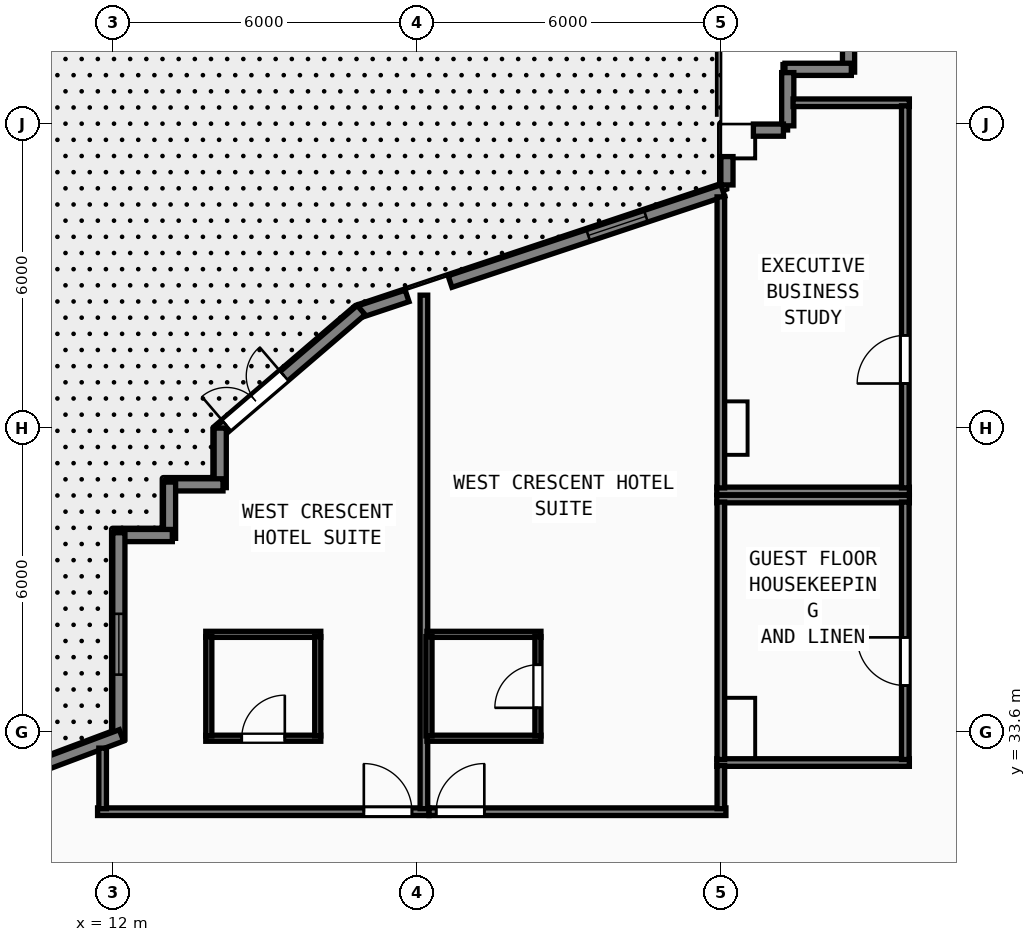
"""IFC4 building model, lengths in metres.
Left out: names, types, materials, properties, quantities, classifications, styles, units other than length and angle.
Written with IfcOpenShell. Run it as: python <this file> out.ifc"""

import sys

from ifc_helpers import new_model, si_unit, direction, frame, frame_2d, origin, origin_2d, place, context, subcontext, project, spatial, rectangle, hollow_rectangle, extrude, element, fill, save


model = new_model("IFC4")
c1 = context("Model", 3, precision=1e-05, world=origin(), true_north=direction((0.0, 1.0)))
c2 = subcontext(c1, "Body", "Model", "MODEL_VIEW")
j1 = project(units=[si_unit("LENGTHUNIT", "METRE"), si_unit("PLANEANGLEUNIT", "RADIAN")], contexts=[c1])
p1 = place(None, origin())
s1 = spatial("IfcSite", under=j1, at=p1, CompositionType="ELEMENT")
p2 = place(p1, origin())
s2 = spatial("IfcBuilding", under=s1, at=p2, CompositionType="ELEMENT")
p3 = place(p2, frame((0.0, 0.0, 24.0)))
s3 = spatial("IfcBuildingStorey", under=s2, at=p3, CompositionType="ELEMENT", Elevation=24.0)
for number, where, z_axis, x_axis in (
    (1, (24.0, 33.6, 0.0), (0.0, 0.0, 1.0), (1.0, 0.0, 0.0)),
    (2, (24.0, 45.6, 0.0), (0.0, 0.0, 1.0), (1.0, 0.0, 0.0)),
):
    element("IfcColumn", number, at=place(p3, frame(where, z_axis=z_axis, x_axis=x_axis)), inside=s3, PredefinedType="COLUMN", context=c2, shape_type="SweptSolid", body=[
        extrude(hollow_rectangle(XDim=1.3, YDim=1.3, WallThickness=0.048, at=origin_2d()), origin(), (0.0, 0.0, 1.0), 3.8),
    ])
for number, where, z_axis, x_axis in (
    (3, (24.0, 39.6, -0.26), (0.0, 0.0, 1.0), (1.0, 0.0, 0.0)),
    (4, (18.3, 42.0, -0.26), (0.0, 0.0, 1.0), (1.0, 0.0, 0.0)),
):
    element("IfcColumn", number, at=place(p3, frame(where, z_axis=z_axis, x_axis=x_axis)), inside=s3, PredefinedType="COLUMN", context=c2, shape_type="SweptSolid", body=[
        extrude(hollow_rectangle(XDim=1.0, YDim=1.0, WallThickness=0.038, at=origin_2d()), origin(), (0.0, 0.0, 1.0), 4.06),
    ])
p4 = place(p3, frame((26.52, 47.995, 0.0), z_axis=(0.0, 0.0, 1.0), x_axis=(0.0, -1.0, 0.0)))
e5 = element("IfcWall", 5, at=p4, inside=s3, PredefinedType="SOLIDWALL", context=c2, shape_type="SweptSolid", body=[
    extrude(rectangle(XDim=1.37, YDim=0.24, at=frame_2d((0.685, 0.0))), origin(), (0.0, 0.0, 1.0), 3.6),
])
p5 = place(p3, frame((26.575, 46.68, 0.0), z_axis=(0.0, 0.0, 1.0), x_axis=(-1.0, 0.0, 0.0)))
e6 = element("IfcWall", 6, at=p5, inside=s3, PredefinedType="SOLIDWALL", context=c2, shape_type="SweptSolid", body=[
    extrude(rectangle(XDim=1.31, YDim=0.24, at=frame_2d((0.655, 0.0))), origin(), (0.0, 0.0, 1.0), 3.6),
])
p6 = place(p3, frame((25.32, 46.615, 0.0), z_axis=(0.0, 0.0, 1.0), x_axis=(0.0, -1.0, 0.0)))
e7 = element("IfcWall", 7, at=p6, inside=s3, PredefinedType="SOLIDWALL", context=c2, shape_type="SweptSolid", body=[
    extrude(rectangle(XDim=1.05, YDim=0.24, at=frame_2d((0.525, 0.0))), origin(), (0.0, 0.0, 1.0), 3.6),
])
p7 = place(p3, frame((25.235, 45.48, 0.0), z_axis=(0.0, 0.0, 1.0), x_axis=(-1.0, 0.0, 0.0)))
e8 = element("IfcWall", 8, at=p7, inside=s3, PredefinedType="SOLIDWALL", context=c2, shape_type="SweptSolid", body=[
    extrude(rectangle(XDim=0.593, YDim=0.24, at=frame_2d((0.296, 0.0))), origin(), (0.0, 0.0, 1.0), 3.6),
])
p8 = place(p3, frame((24.12, 44.958, 0.0), z_axis=(0.0, 0.0, 1.0), x_axis=(0.0, -1.0, 0.0)))
e9 = element("IfcWall", 9, at=p8, inside=s3, PredefinedType="SOLIDWALL", context=c2, shape_type="SweptSolid", body=[
    extrude(rectangle(XDim=0.56, YDim=0.24, at=frame_2d((0.28, 0.0))), origin(), (0.0, 0.0, 1.0), 3.097),
])
p9 = place(p3, frame((24.039, 44.287, 0.0), z_axis=(0.0, 0.0, 1.0), x_axis=(-0.948678995954, -0.316240672014, 0.0)))
e10 = element("IfcWall", 10, at=p9, inside=s3, PredefinedType="SOLIDWALL", context=c2, shape_type="SweptSolid", body=[
    extrude(rectangle(XDim=5.675, YDim=0.24, at=frame_2d((2.837, 0.0))), origin(), (0.0, 0.0, 1.0), 3.097),
])
p10 = place(p9, frame((1.6, 0.0, 0.85)))
e11 = element("IfcOpeningElement", 11, at=p10, cuts=e10, PredefinedType="OPENING", context=c2, shape_type="SweptSolid", body=[
    extrude(rectangle(XDim=1.2, YDim=1.85, at=frame_2d((0.6, 0.925))), frame((0.0, 0.13, 0.0), z_axis=(0.0, -1.0, 0.0), x_axis=(1.0, 0.0, 0.0)), (0.0, 0.0, 1.0), 0.26),
])
p11 = place(p3, frame((17.808, 42.209, 0.0), z_axis=(0.0, 0.0, 1.0), x_axis=(-0.948706457285, -0.316158279832, 0.0)))
e12 = element("IfcWall", 12, at=p11, inside=s3, PredefinedType="SOLIDWALL", context=c2, shape_type="SweptSolid", body=[
    extrude(rectangle(XDim=1.054, YDim=0.24, at=frame_2d((0.527, 0.0))), origin(), (0.0, 0.0, 1.0), 3.6),
])
p12 = place(p3, frame((16.902, 41.929, 0.0), z_axis=(0.0, 0.0, 1.0), x_axis=(-0.759275136126, -0.650769750112, 0.0)))
e13 = element("IfcWall", 13, at=p12, inside=s3, PredefinedType="SOLIDWALL", context=c2, shape_type="SweptSolid", body=[
    extrude(rectangle(XDim=3.719, YDim=0.24, at=frame_2d((1.86, 0.0))), origin(), (0.0, 0.0, 1.0), 3.6),
])
p13 = place(p12, frame((3.499, 0.0, 0.0), z_axis=(0.0, 0.0, 1.0), x_axis=(-1.0, 0.0, 0.0)))
e14 = element("IfcOpeningElement", 14, at=p13, cuts=e13, PredefinedType="OPENING", context=c2, shape_type="SweptSolid", body=[
    extrude(rectangle(XDim=1.5, YDim=2.2, at=frame_2d((0.75, 1.1))), frame((0.0, 0.13, 0.0), z_axis=(0.0, -1.0, 0.0), x_axis=(1.0, 0.0, 0.0)), (0.0, 0.0, 1.0), 0.26),
])
p14 = place(p3, frame((14.12, 39.6, 0.0), z_axis=(0.0, 0.0, 1.0), x_axis=(0.0, -1.0, 0.0)))
e15 = element("IfcWall", 15, at=p14, inside=s3, PredefinedType="SOLIDWALL", context=c2, shape_type="SweptSolid", body=[
    extrude(rectangle(XDim=1.175, YDim=0.24, at=frame_2d((0.587, 0.0))), origin(), (0.0, 0.0, 1.0), 3.6),
])
p15 = place(p3, frame((14.175, 38.48, 0.0), z_axis=(0.0, 0.0, 1.0), x_axis=(-1.0, 0.0, 0.0)))
e16 = element("IfcWall", 16, at=p15, inside=s3, PredefinedType="SOLIDWALL", context=c2, shape_type="SweptSolid", body=[
    extrude(rectangle(XDim=1.11, YDim=0.24, at=frame_2d((0.555, 0.0))), origin(), (0.0, 0.0, 1.0), 3.6),
])
p16 = place(p3, frame((13.12, 38.535, 0.0), z_axis=(0.0, 0.0, 1.0), x_axis=(0.0, -1.0, 0.0)))
e17 = element("IfcWall", 17, at=p16, inside=s3, PredefinedType="SOLIDWALL", context=c2, shape_type="SweptSolid", body=[
    extrude(rectangle(XDim=1.11, YDim=0.24, at=frame_2d((0.555, 0.0))), origin(), (0.0, 0.0, 1.0), 3.6),
])
p17 = place(p3, frame((13.175, 37.48, 0.0), z_axis=(0.0, 0.0, 1.0), x_axis=(-1.0, 0.0, 0.0)))
e18 = element("IfcWall", 18, at=p17, inside=s3, PredefinedType="SOLIDWALL", context=c2, shape_type="SweptSolid", body=[
    extrude(rectangle(XDim=1.11, YDim=0.24, at=frame_2d((0.555, 0.0))), origin(), (0.0, 0.0, 1.0), 3.6),
])
p18 = place(p3, frame((12.12, 37.535, 0.0), z_axis=(0.0, 0.0, 1.0), x_axis=(0.0, -1.0, 0.0)))
e19 = element("IfcWall", 19, at=p18, inside=s3, PredefinedType="SOLIDWALL", context=c2, shape_type="SweptSolid", body=[
    extrude(rectangle(XDim=4.073, YDim=0.24, at=frame_2d((2.037, 0.0))), origin(), (0.0, 0.0, 1.0), 3.6),
])
p19 = place(p18, frame((1.6, 0.0, 0.85)))
e20 = element("IfcOpeningElement", 20, at=p19, cuts=e19, PredefinedType="OPENING", context=c2, shape_type="SweptSolid", body=[
    extrude(rectangle(XDim=1.2, YDim=1.85, at=frame_2d((0.6, 0.925))), frame((0.0, 0.13, 0.0), z_axis=(0.0, -1.0, 0.0), x_axis=(1.0, 0.0, 0.0)), (0.0, 0.0, 1.0), 0.26),
])
p20 = place(p3, frame((12.171, 33.536, 0.0), z_axis=(0.0, 0.0, 1.0), x_axis=(-0.936327744176, -0.351127263946, 0.0)))
e21 = element("IfcWall", 21, at=p20, inside=s3, PredefinedType="SOLIDWALL", context=c2, shape_type="SweptSolid", body=[
    extrude(rectangle(XDim=7.0, YDim=0.24, at=frame_2d((3.5, 0.0))), origin(), (0.0, 0.0, 1.0), 3.6),
])
p21 = place(p20, frame((1.6, 0.0, 0.85)))
e22 = element("IfcOpeningElement", 22, at=p21, cuts=e21, PredefinedType="OPENING", context=c2, shape_type="SweptSolid", body=[
    extrude(rectangle(XDim=1.2, YDim=1.85, at=frame_2d((0.6, 0.925))), frame((0.0, 0.13, 0.0), z_axis=(0.0, -1.0, 0.0), x_axis=(1.0, 0.0, 0.0)), (0.0, 0.0, 1.0), 0.26),
])
for number, where, z_axis, x_axis in (
    (23, (23.92, 38.2, 0.0), (0.0, 0.0, 1.0), (1.0, 0.0, 0.0)),
    (24, (23.92, 33.0, 0.0), (0.0, 0.0, 1.0), (1.0, 0.0, 0.0)),
):
    element("IfcWall", number, at=place(p3, frame(where, z_axis=z_axis, x_axis=x_axis)), inside=s3, PredefinedType="PARTITIONING", context=c2, shape_type="SweptSolid", body=[
        extrude(rectangle(XDim=3.8, YDim=0.15, at=frame_2d((1.9, 0.0))), origin(), (0.0, 0.0, 1.0), 3.6),
    ])
p22 = place(p3, frame((24.0, 33.06, 0.0), z_axis=(0.0, 0.0, 1.0), x_axis=(0.0, 1.0, 0.0)))
e25 = element("IfcWall", 25, at=p22, inside=s3, PredefinedType="PARTITIONING", context=c2, shape_type="SweptSolid", body=[
    extrude(rectangle(XDim=5.08, YDim=0.15, at=frame_2d((2.54, 0.0))), origin(), (0.0, 0.0, 1.0), 3.097),
])
p23 = place(p3, frame((27.64, 33.06, 0.0), z_axis=(0.0, 0.0, 1.0), x_axis=(0.0, 1.0, 0.0)))
e26 = element("IfcWall", 26, at=p23, inside=s3, PredefinedType="PARTITIONING", context=c2, shape_type="SweptSolid", body=[
    extrude(rectangle(XDim=5.08, YDim=0.15, at=frame_2d((2.54, 0.0))), origin(), (0.0, 0.0, 1.0), 3.6),
])
p24 = place(p23, frame((2.41, 0.0, 0.0), z_axis=(0.0, 0.0, 1.0), x_axis=(-1.0, 0.0, 0.0)))
e27 = element("IfcOpeningElement", 27, at=p24, cuts=e26, PredefinedType="OPENING", context=c2, shape_type="SweptSolid", body=[
    extrude(rectangle(XDim=0.95, YDim=2.12, at=frame_2d((0.475, 1.06))), frame((0.0, 0.085, 0.0), z_axis=(0.0, -1.0, 0.0), x_axis=(1.0, 0.0, 0.0)), (0.0, 0.0, 1.0), 0.17),
])
p25 = place(p3, frame((25.425, 46.02, 0.0), z_axis=(0.0, 0.0, 1.0), x_axis=(1.0, 0.0, 0.0)))
e28 = element("IfcWall", 28, at=p25, inside=s3, PredefinedType="PARTITIONING", context=c2, shape_type="SweptSolid", body=[
    extrude(rectangle(XDim=2.295, YDim=0.15, at=frame_2d((1.147, 0.0))), origin(), (0.0, 0.0, 1.0), 3.6),
])
p26 = place(p3, frame((23.92, 38.36, 0.0), z_axis=(0.0, 0.0, 1.0), x_axis=(1.0, 0.0, 0.0)))
e29 = element("IfcWall", 29, at=p26, inside=s3, PredefinedType="PARTITIONING", context=c2, shape_type="SweptSolid", body=[
    extrude(rectangle(XDim=3.8, YDim=0.15, at=frame_2d((1.9, 0.0))), origin(), (0.0, 0.0, 1.0), 3.6),
])
p27 = place(p3, frame((24.0, 38.42, 0.0), z_axis=(0.0, 0.0, 1.0), x_axis=(0.0, 1.0, 0.0)))
e30 = element("IfcWall", 30, at=p27, inside=s3, PredefinedType="PARTITIONING", context=c2, shape_type="SweptSolid", body=[
    extrude(rectangle(XDim=5.743, YDim=0.15, at=frame_2d((2.872, 0.0))), origin(), (0.0, 0.0, 1.0), 3.097),
])
p28 = place(p3, frame((27.64, 38.42, 0.0), z_axis=(0.0, 0.0, 1.0), x_axis=(0.0, 1.0, 0.0)))
e31 = element("IfcWall", 31, at=p28, inside=s3, PredefinedType="PARTITIONING", context=c2, shape_type="SweptSolid", body=[
    extrude(rectangle(XDim=7.54, YDim=0.15, at=frame_2d((3.77, 0.0))), origin(), (0.0, 0.0, 1.0), 3.6),
])
p29 = place(p28, frame((3.01, 0.0, 0.0), z_axis=(0.0, 0.0, 1.0), x_axis=(-1.0, 0.0, 0.0)))
e32 = element("IfcOpeningElement", 32, at=p29, cuts=e31, PredefinedType="OPENING", context=c2, shape_type="SweptSolid", body=[
    extrude(rectangle(XDim=0.95, YDim=2.12, at=frame_2d((0.475, 1.06))), frame((0.0, 0.085, 0.0), z_axis=(0.0, -1.0, 0.0), x_axis=(1.0, 0.0, 0.0)), (0.0, 0.0, 1.0), 0.17),
])
p30 = place(p3, frame((11.7, 32.03, 0.0), z_axis=(0.0, 0.0, 1.0), x_axis=(1.0, 0.0, 0.0)))
e33 = element("IfcWall", 33, at=p30, inside=s3, PredefinedType="PARTITIONING", context=c2, shape_type="SweptSolid", body=[
    extrude(rectangle(XDim=6.54, YDim=0.15, at=frame_2d((3.27, 0.0))), origin(), (0.0, 0.0, 1.0), 3.6),
])
p31 = place(p30, frame((5.254, 0.0, 0.0)))
e34 = element("IfcOpeningElement", 34, at=p31, cuts=e33, PredefinedType="OPENING", context=c2, shape_type="SweptSolid", body=[
    extrude(rectangle(XDim=0.95, YDim=2.18, at=frame_2d((0.475, 1.09))), frame((0.0, 0.085, 0.0), z_axis=(0.0, -1.0, 0.0), x_axis=(1.0, 0.0, 0.0)), (0.0, 0.0, 1.0), 0.17),
])
p32 = place(p3, frame((11.8, 32.09, 0.0), z_axis=(0.0, 0.0, 1.0), x_axis=(0.0, 1.0, 0.0)))
e35 = element("IfcWall", 35, at=p32, inside=s3, PredefinedType="PARTITIONING", context=c2, shape_type="SweptSolid", body=[
    extrude(rectangle(XDim=1.195, YDim=0.15, at=frame_2d((0.597, 0.0))), origin(), (0.0, 0.0, 1.0), 3.6),
])
p33 = place(p3, frame((18.14, 32.09, 0.0), z_axis=(0.0, 0.0, 1.0), x_axis=(0.0, 1.0, 0.0)))
e36 = element("IfcWall", 36, at=p33, inside=s3, PredefinedType="PARTITIONING", context=c2, shape_type="SweptSolid", body=[
    extrude(rectangle(XDim=10.133, YDim=0.15, at=frame_2d((5.066, 0.0))), origin(), (0.0, 0.0, 1.0), 3.6),
])
p34 = place(p3, frame((13.835, 35.53, 0.0), z_axis=(0.0, 0.0, 1.0), x_axis=(1.0, 0.0, 0.0)))
e37 = element("IfcWall", 37, at=p34, inside=s3, PredefinedType="PARTITIONING", context=c2, shape_type="SweptSolid", body=[
    extrude(rectangle(XDim=2.27, YDim=0.12, at=frame_2d((1.135, 0.0))), origin(), (0.0, 0.0, 1.0), 3.6),
])
p35 = place(p3, frame((13.835, 33.48, 0.0), z_axis=(0.0, 0.0, 1.0), x_axis=(1.0, 0.0, 0.0)))
e38 = element("IfcWall", 38, at=p35, inside=s3, PredefinedType="PARTITIONING", context=c2, shape_type="SweptSolid", body=[
    extrude(rectangle(XDim=2.27, YDim=0.12, at=frame_2d((1.135, 0.0))), origin(), (0.0, 0.0, 1.0), 3.6),
])
p36 = place(p35, frame((0.71, 0.0, 0.0)))
e39 = element("IfcOpeningElement", 39, at=p36, cuts=e38, PredefinedType="OPENING", context=c2, shape_type="SweptSolid", body=[
    extrude(rectangle(XDim=0.85, YDim=2.1, at=frame_2d((0.425, 1.05))), frame((0.0, 0.07, 0.0), z_axis=(0.0, -1.0, 0.0), x_axis=(1.0, 0.0, 0.0)), (0.0, 0.0, 1.0), 0.14),
])
for number, where, z_axis, x_axis in (
    (40, (13.895, 33.525, 0.0), (0.0, 0.0, 1.0), (0.0, 1.0, 0.0)),
    (41, (16.045, 33.525, 0.0), (0.0, 0.0, 1.0), (0.0, 1.0, 0.0)),
):
    element("IfcWall", number, at=place(p3, frame(where, z_axis=z_axis, x_axis=x_axis)), inside=s3, PredefinedType="PARTITIONING", context=c2, shape_type="SweptSolid", body=[
        extrude(rectangle(XDim=1.96, YDim=0.12, at=frame_2d((0.98, 0.0))), origin(), (0.0, 0.0, 1.0), 3.6),
    ])
p37 = place(p3, frame((18.242, 32.03, 0.0), z_axis=(0.0, 0.0, 1.0), x_axis=(1.0, 0.0, 0.0)))
e42 = element("IfcWall", 42, at=p37, inside=s3, PredefinedType="PARTITIONING", context=c2, shape_type="SweptSolid", body=[
    extrude(rectangle(XDim=5.858, YDim=0.15, at=frame_2d((2.929, 0.0))), origin(), (0.0, 0.0, 1.0), 3.6),
])
p38 = place(p37, frame((0.14, 0.0, 0.0)))
e43 = element("IfcOpeningElement", 43, at=p38, cuts=e42, PredefinedType="OPENING", context=c2, shape_type="SweptSolid", body=[
    extrude(rectangle(XDim=0.95, YDim=2.18, at=frame_2d((0.475, 1.09))), frame((0.0, 0.085, 0.0), z_axis=(0.0, -1.0, 0.0), x_axis=(1.0, 0.0, 0.0)), (0.0, 0.0, 1.0), 0.17),
])
p39 = place(p3, frame((24.0, 32.09, 0.0), z_axis=(0.0, 0.0, 1.0), x_axis=(0.0, 1.0, 0.0)))
e44 = element("IfcWall", 44, at=p39, inside=s3, PredefinedType="PARTITIONING", context=c2, shape_type="SweptSolid", body=[
    extrude(rectangle(XDim=0.85, YDim=0.15, at=frame_2d((0.425, 0.0))), origin(), (0.0, 0.0, 1.0), 3.097),
])
for number, where, z_axis, x_axis in (
    (45, (18.2, 35.53, 0.0), (0.0, 0.0, 1.0), (1.0, 0.0, 0.0)),
    (46, (18.2, 33.48, 0.0), (0.0, 0.0, 1.0), (1.0, 0.0, 0.0)),
):
    element("IfcWall", number, at=place(p3, frame(where, z_axis=z_axis, x_axis=x_axis)), inside=s3, PredefinedType="PARTITIONING", context=c2, shape_type="SweptSolid", body=[
        extrude(rectangle(XDim=2.25, YDim=0.12, at=frame_2d((1.125, 0.0))), origin(), (0.0, 0.0, 1.0), 3.6),
    ])
p40 = place(p3, frame((18.24, 33.525, 0.0), z_axis=(0.0, 0.0, 1.0), x_axis=(0.0, 1.0, 0.0)))
e47 = element("IfcWall", 47, at=p40, inside=s3, PredefinedType="PARTITIONING", context=c2, shape_type="SweptSolid", body=[
    extrude(rectangle(XDim=1.96, YDim=0.12, at=frame_2d((0.98, 0.0))), origin(), (0.0, 0.0, 1.0), 3.6),
])
p41 = place(p3, frame((20.39, 33.525, 0.0), z_axis=(0.0, 0.0, 1.0), x_axis=(0.0, 1.0, 0.0)))
e48 = element("IfcWall", 48, at=p41, inside=s3, PredefinedType="PARTITIONING", context=c2, shape_type="SweptSolid", body=[
    extrude(rectangle(XDim=1.96, YDim=0.12, at=frame_2d((0.98, 0.0))), origin(), (0.0, 0.0, 1.0), 3.6),
])
p42 = place(p41, frame((0.555, 0.0, 0.0)))
e49 = element("IfcOpeningElement", 49, at=p42, cuts=e48, PredefinedType="OPENING", context=c2, shape_type="SweptSolid", body=[
    extrude(rectangle(XDim=0.85, YDim=2.1, at=frame_2d((0.425, 1.05))), frame((0.0, 0.07, 0.0), z_axis=(0.0, -1.0, 0.0), x_axis=(1.0, 0.0, 0.0)), (0.0, 0.0, 1.0), 0.14),
])
p43 = place(p10, origin())
e50 = element("IfcWindow", 50, at=p43, inside=s3, PartitioningType="SINGLE_PANEL", PredefinedType="WINDOW", context=c2, shape_type="SweptSolid", body=[
    extrude(rectangle(XDim=1.2, YDim=1.85, at=frame_2d((0.6, 0.925))), frame((0.0, 0.03, 0.0), z_axis=(0.0, -1.0, 0.0), x_axis=(1.0, 0.0, 0.0)), (0.0, 0.0, 1.0), 0.06),
])
fill(e11, e50)
p44 = place(p19, origin())
e51 = element("IfcWindow", 51, at=p44, inside=s3, PartitioningType="SINGLE_PANEL", PredefinedType="WINDOW", context=c2, shape_type="SweptSolid", body=[
    extrude(rectangle(XDim=1.2, YDim=1.85, at=frame_2d((0.6, 0.925))), frame((0.0, 0.03, 0.0), z_axis=(0.0, -1.0, 0.0), x_axis=(1.0, 0.0, 0.0)), (0.0, 0.0, 1.0), 0.06),
])
fill(e20, e51)
p45 = place(p13, origin())
e52 = element("IfcDoor", 52, at=p45, inside=s3, OperationType="DOUBLE_DOOR_SINGLE_SWING", PredefinedType="DOOR", context=c2, shape_type="SweptSolid", body=[
    extrude(rectangle(XDim=1.5, YDim=2.2, at=frame_2d((0.75, 1.1))), frame((0.0, 0.025, 0.0), z_axis=(0.0, -1.0, 0.0), x_axis=(1.0, 0.0, 0.0)), (0.0, 0.0, 1.0), 0.05),
])
fill(e14, e52)
p46 = place(p24, origin())
e53 = element("IfcDoor", 53, at=p46, inside=s3, OperationType="SINGLE_SWING_LEFT", PredefinedType="DOOR", context=c2, shape_type="SweptSolid", body=[
    extrude(rectangle(XDim=0.95, YDim=2.12, at=frame_2d((0.475, 1.06))), frame((0.0, 0.025, 0.0), z_axis=(0.0, -1.0, 0.0), x_axis=(1.0, 0.0, 0.0)), (0.0, 0.0, 1.0), 0.05),
])
fill(e27, e53)
p47 = place(p29, origin())
e54 = element("IfcDoor", 54, at=p47, inside=s3, OperationType="SINGLE_SWING_RIGHT", PredefinedType="DOOR", context=c2, shape_type="SweptSolid", body=[
    extrude(rectangle(XDim=0.95, YDim=2.12, at=frame_2d((0.475, 1.06))), frame((0.0, 0.025, 0.0), z_axis=(0.0, -1.0, 0.0), x_axis=(1.0, 0.0, 0.0)), (0.0, 0.0, 1.0), 0.05),
])
fill(e32, e54)
p48 = place(p31, origin())
e55 = element("IfcDoor", 55, at=p48, inside=s3, OperationType="SINGLE_SWING_LEFT", PredefinedType="DOOR", context=c2, shape_type="SweptSolid", body=[
    extrude(rectangle(XDim=0.95, YDim=2.18, at=frame_2d((0.475, 1.09))), frame((0.0, 0.025, 0.0), z_axis=(0.0, -1.0, 0.0), x_axis=(1.0, 0.0, 0.0)), (0.0, 0.0, 1.0), 0.05),
])
fill(e34, e55)
p49 = place(p36, origin())
e56 = element("IfcDoor", 56, at=p49, inside=s3, OperationType="SINGLE_SWING_RIGHT", PredefinedType="DOOR", context=c2, shape_type="SweptSolid", body=[
    extrude(rectangle(XDim=0.85, YDim=2.1, at=frame_2d((0.425, 1.05))), frame((0.0, 0.025, 0.0), z_axis=(0.0, -1.0, 0.0), x_axis=(1.0, 0.0, 0.0)), (0.0, 0.0, 1.0), 0.05),
])
fill(e39, e56)
p50 = place(p38, origin())
e57 = element("IfcDoor", 57, at=p50, inside=s3, OperationType="SINGLE_SWING_RIGHT", PredefinedType="DOOR", context=c2, shape_type="SweptSolid", body=[
    extrude(rectangle(XDim=0.95, YDim=2.18, at=frame_2d((0.475, 1.09))), frame((0.0, 0.025, 0.0), z_axis=(0.0, -1.0, 0.0), x_axis=(1.0, 0.0, 0.0)), (0.0, 0.0, 1.0), 0.05),
])
fill(e43, e57)
p51 = place(p42, origin())
e58 = element("IfcDoor", 58, at=p51, inside=s3, OperationType="SINGLE_SWING_LEFT", PredefinedType="DOOR", context=c2, shape_type="SweptSolid", body=[
    extrude(rectangle(XDim=0.85, YDim=2.1, at=frame_2d((0.425, 1.05))), frame((0.0, 0.025, 0.0), z_axis=(0.0, -1.0, 0.0), x_axis=(1.0, 0.0, 0.0)), (0.0, 0.0, 1.0), 0.05),
])
fill(e49, e58)
save(model, sys.argv[1])
